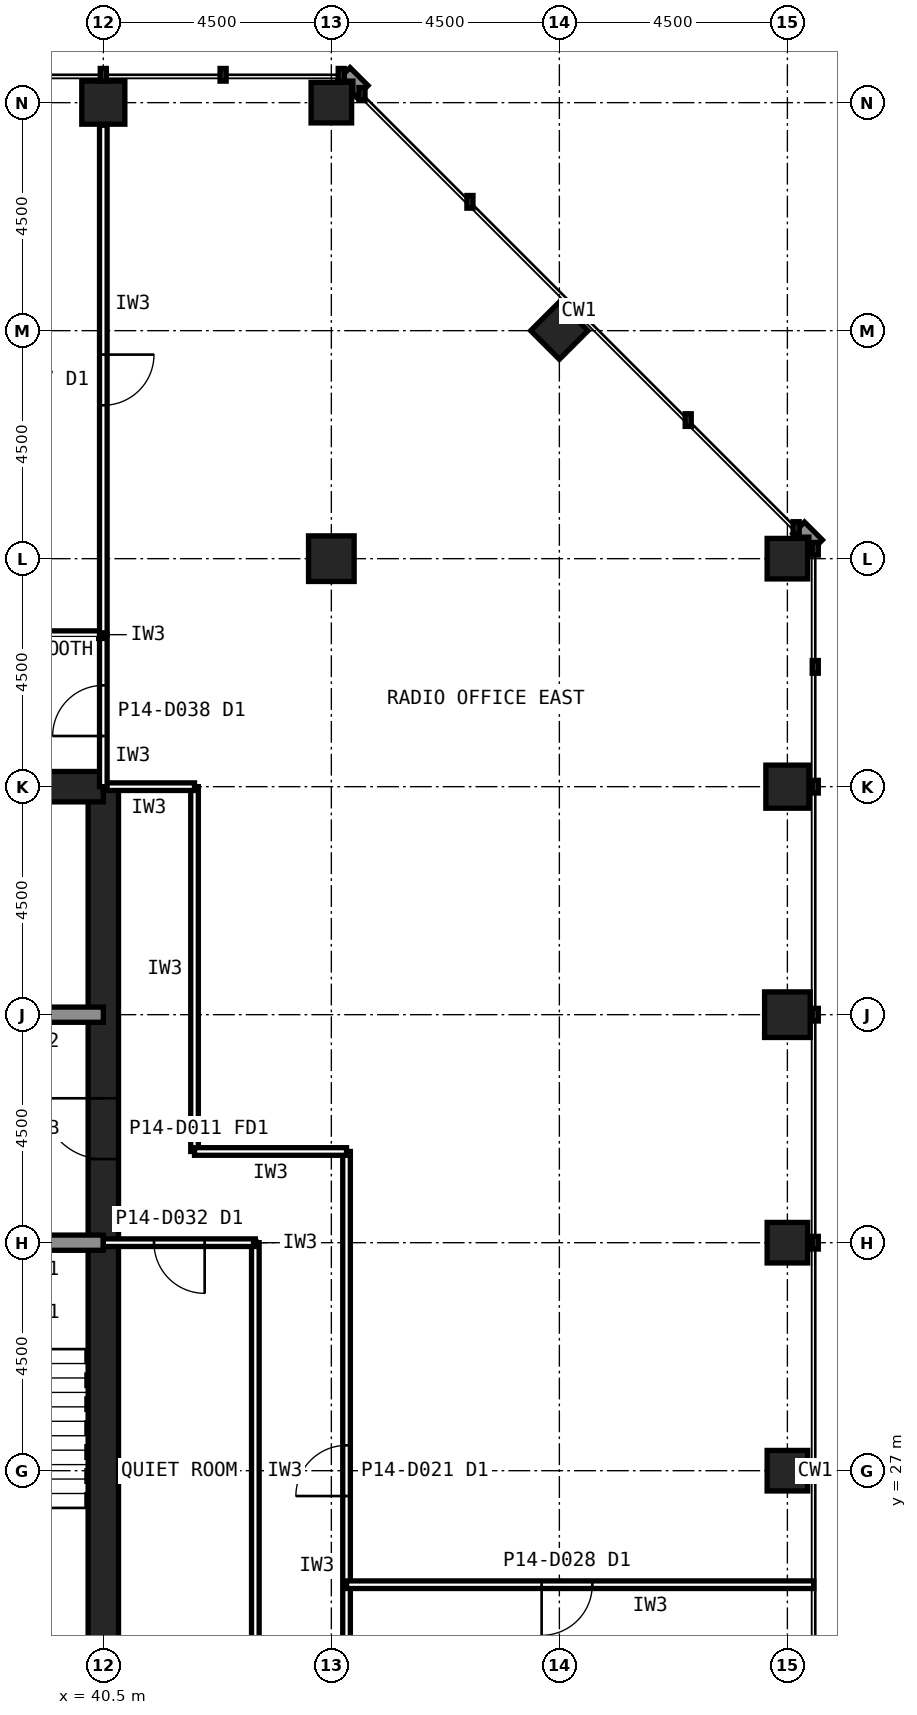
"""IFC4 building model, lengths in metres.
Left out: names, types, materials, properties, quantities, classifications, styles, units other than length and angle.
Written with IfcOpenShell. Run it as: python <this file> out.ifc"""

import sys

from ifc_helpers import new_model, si_unit, direction, frame, frame_2d, origin, origin_2d, place, context, subcontext, project, spatial, rectangle, hollow_rectangle, extrude, element, fill, save


model = new_model("IFC4")
c1 = context("Model", 3, precision=1e-05, world=origin(), true_north=direction((0.0, 1.0)))
c2 = subcontext(c1, "Body", "Model", "MODEL_VIEW")
j1 = project(units=[si_unit("LENGTHUNIT", "METRE"), si_unit("PLANEANGLEUNIT", "RADIAN")], contexts=[c1])
p1 = place(None, origin())
s1 = spatial("IfcSite", under=j1, at=p1, CompositionType="ELEMENT")
p2 = place(p1, origin())
s2 = spatial("IfcBuilding", under=s1, at=p2, CompositionType="ELEMENT")
p3 = place(p2, frame((0.0, 0.0, 62.6)))
s3 = spatial("IfcBuildingStorey", under=s2, at=p3, CompositionType="ELEMENT", Elevation=62.6)
for number, where, z_axis, x_axis in (
    (1, (54.0, 27.0, 0.0), (0.0, 0.0, 1.0), (1.0, 0.0, 0.0)),
    (2, (54.0, 31.5, 0.0), (0.0, 0.0, 1.0), (1.0, 0.0, 0.0)),
):
    element("IfcColumn", number, at=place(p3, frame(where, z_axis=z_axis, x_axis=x_axis)), inside=s3, PredefinedType="COLUMN", context=c2, shape_type="SweptSolid", body=[
        extrude(hollow_rectangle(XDim=0.8, YDim=0.8, WallThickness=0.045, at=origin_2d()), origin(), (0.0, 0.0, 1.0), 4.2),
    ])
p4 = place(p3, frame((54.0, 36.0, 0.0), z_axis=(0.0, 0.0, 1.0), x_axis=(1.0, 0.0, 0.0)))
e3 = element("IfcColumn", 3, at=p4, inside=s3, PredefinedType="COLUMN", context=c2, shape_type="SweptSolid", body=[
    extrude(hollow_rectangle(XDim=0.9, YDim=0.9, WallThickness=0.063, at=origin_2d()), origin(), (0.0, 0.0, 1.0), 4.2),
])
p5 = place(p3, frame((54.0, 40.5, 0.0), z_axis=(0.0, 0.0, 1.0), x_axis=(1.0, 0.0, 0.0)))
e4 = element("IfcColumn", 4, at=p5, inside=s3, PredefinedType="COLUMN", context=c2, shape_type="SweptSolid", body=[
    extrude(hollow_rectangle(XDim=0.85, YDim=0.85, WallThickness=0.05, at=origin_2d()), origin(), (0.0, 0.0, 1.0), 4.2),
])
for number, where, z_axis, x_axis in (
    (5, (54.0, 45.0, 0.0), (0.0, 0.0, 1.0), (1.0, 0.0, 0.0)),
    (6, (45.0, 54.0, 0.0), (0.0, 0.0, 1.0), (1.0, 0.0, 0.0)),
):
    element("IfcColumn", number, at=place(p3, frame(where, z_axis=z_axis, x_axis=x_axis)), inside=s3, PredefinedType="COLUMN", context=c2, shape_type="SweptSolid", body=[
        extrude(hollow_rectangle(XDim=0.8, YDim=0.8, WallThickness=0.045, at=origin_2d()), origin(), (0.0, 0.0, 1.0), 4.2),
    ])
p6 = place(p3, frame((40.5, 54.0, 0.0), z_axis=(0.0, 0.0, 1.0), x_axis=(1.0, 0.0, 0.0)))
e7 = element("IfcColumn", 7, at=p6, inside=s3, PredefinedType="COLUMN", context=c2, shape_type="SweptSolid", body=[
    extrude(hollow_rectangle(XDim=0.85, YDim=0.85, WallThickness=0.05, at=origin_2d()), origin(), (0.0, 0.0, 1.0), 4.2),
])
p7 = place(p3, frame((49.5, 49.5, 0.0), z_axis=(0.0, 0.0, 1.0), x_axis=(0.707106781187, 0.707106781187, 0.0)))
e8 = element("IfcColumn", 8, at=p7, inside=s3, PredefinedType="COLUMN", context=c2, shape_type="SweptSolid", body=[
    extrude(hollow_rectangle(XDim=0.8, YDim=0.8, WallThickness=0.045, at=origin_2d()), origin(), (0.0, 0.0, 1.0), 4.2),
])
p8 = place(p3, frame((45.0, 45.0, 0.0), z_axis=(0.0, 0.0, 1.0), x_axis=(1.0, 0.0, 0.0)))
e9 = element("IfcColumn", 9, at=p8, inside=s3, PredefinedType="COLUMN", context=c2, shape_type="SweptSolid", body=[
    extrude(hollow_rectangle(XDim=0.9, YDim=0.9, WallThickness=0.063, at=origin_2d()), origin(), (0.0, 0.0, 1.0), 4.2),
])
p9 = place(p3, frame((40.5, 13.5, 0.0), z_axis=(0.0, 0.0, 1.0), x_axis=(0.0, 1.0, 0.0)))
e10 = element("IfcWall", 10, at=p9, inside=s3, PredefinedType="SHEAR", context=c2, shape_type="SweptSolid", body=[
    extrude(rectangle(XDim=27.0, YDim=0.6, at=frame_2d((13.5, 0.0))), origin(), (0.0, 0.0, 1.0), 4.2),
])
p10 = place(p9, frame((5.85, 0.0, 0.0)))
e11 = element("IfcOpeningElement", 11, at=p10, cuts=e10, PredefinedType="OPENING", context=c2, shape_type="SweptSolid", body=[
    extrude(rectangle(XDim=1.8, YDim=2.1, at=frame_2d((0.9, 1.05))), frame((0.0, 0.31, 0.0), z_axis=(0.0, -1.0, 0.0), x_axis=(1.0, 0.0, 0.0)), (0.0, 0.0, 1.0), 0.62),
])
p11 = place(p9, frame((19.65, 0.0, 0.0)))
e12 = element("IfcOpeningElement", 12, at=p11, cuts=e10, PredefinedType="OPENING", context=c2, shape_type="SweptSolid", body=[
    extrude(rectangle(XDim=1.2, YDim=2.1, at=frame_2d((0.6, 1.05))), frame((0.0, 0.31, 0.0), z_axis=(0.0, -1.0, 0.0), x_axis=(1.0, 0.0, 0.0)), (0.0, 0.0, 1.0), 0.62),
])
p12 = place(p3, frame((40.5, 40.5, 0.0), z_axis=(0.0, 0.0, 1.0), x_axis=(-1.0, 0.0, 0.0)))
e13 = element("IfcWall", 13, at=p12, inside=s3, PredefinedType="SHEAR", context=c2, shape_type="SweptSolid", body=[
    extrude(rectangle(XDim=27.0, YDim=0.6, at=frame_2d((13.5, 0.0))), origin(), (0.0, 0.0, 1.0), 4.2),
])
p13 = place(p3, frame((13.5, 36.0, 0.0), z_axis=(0.0, 0.0, 1.0), x_axis=(1.0, 0.0, 0.0)))
e14 = element("IfcWall", 14, at=p13, inside=s3, PredefinedType="SOLIDWALL", context=c2, shape_type="SweptSolid", body=[
    extrude(rectangle(XDim=27.0, YDim=0.3, at=frame_2d((13.5, 0.0))), origin(), (0.0, 0.0, 1.0), 4.04),
])
p14 = place(p13, frame((1.8, 0.0, 0.0)))
e15 = element("IfcOpeningElement", 15, at=p14, cuts=e14, PredefinedType="OPENING", context=c2, shape_type="SweptSolid", body=[
    extrude(rectangle(XDim=0.9, YDim=2.1, at=frame_2d((0.45, 1.05))), frame((0.0, 0.16, 0.0), z_axis=(0.0, -1.0, 0.0), x_axis=(1.0, 0.0, 0.0)), (0.0, 0.0, 1.0), 0.32),
])
p15 = place(p13, frame((24.1, 0.0, 0.0)))
e16 = element("IfcOpeningElement", 16, at=p15, cuts=e14, PredefinedType="OPENING", context=c2, shape_type="SweptSolid", body=[
    extrude(rectangle(XDim=1.3, YDim=2.2, at=frame_2d((0.65, 1.1))), frame((0.0, 0.16, 0.0), z_axis=(0.0, -1.0, 0.0), x_axis=(1.0, 0.0, 0.0)), (0.0, 0.0, 1.0), 0.32),
])
p16 = place(p3, frame((13.5, 31.5, 0.0), z_axis=(0.0, 0.0, 1.0), x_axis=(1.0, 0.0, 0.0)))
e17 = element("IfcWall", 17, at=p16, inside=s3, PredefinedType="SOLIDWALL", context=c2, shape_type="SweptSolid", body=[
    extrude(rectangle(XDim=27.0, YDim=0.3, at=frame_2d((13.5, 0.0))), origin(), (0.0, 0.0, 1.0), 4.04),
])
p17 = place(p16, frame((24.15, 0.0, 0.0)))
e18 = element("IfcOpeningElement", 18, at=p17, cuts=e17, PredefinedType="OPENING", context=c2, shape_type="SweptSolid", body=[
    extrude(rectangle(XDim=1.2, YDim=2.1, at=frame_2d((0.6, 1.05))), frame((0.0, 0.16, 0.0), z_axis=(0.0, -1.0, 0.0), x_axis=(1.0, 0.0, 0.0)), (0.0, 0.0, 1.0), 0.32),
])
p18 = place(p16, frame((15.3, 0.0, 0.0)))
e19 = element("IfcOpeningElement", 19, at=p18, cuts=e17, PredefinedType="OPENING", context=c2, shape_type="SweptSolid", body=[
    extrude(rectangle(XDim=0.9, YDim=2.1, at=frame_2d((0.45, 1.05))), frame((0.0, 0.16, 0.0), z_axis=(0.0, -1.0, 0.0), x_axis=(1.0, 0.0, 0.0)), (0.0, 0.0, 1.0), 0.32),
])
p19 = place(p16, frame((19.8, 0.0, 0.0)))
e20 = element("IfcOpeningElement", 20, at=p19, cuts=e17, PredefinedType="OPENING", context=c2, shape_type="SweptSolid", body=[
    extrude(rectangle(XDim=0.9, YDim=2.1, at=frame_2d((0.45, 1.05))), frame((0.0, 0.16, 0.0), z_axis=(0.0, -1.0, 0.0), x_axis=(1.0, 0.0, 0.0)), (0.0, 0.0, 1.0), 0.32),
])
p20 = place(p3, frame((45.3, 20.7, 0.0), z_axis=(0.0, 0.0, 1.0), x_axis=(0.0, 1.0, 0.0)))
e21 = element("IfcWall", 21, at=p20, inside=s3, PredefinedType="PARTITIONING", context=c2, shape_type="SweptSolid", body=[
    extrude(rectangle(XDim=12.6, YDim=0.15, at=frame_2d((6.3, 0.0))), origin(), (0.0, 0.0, 1.0), 4.04),
])
p21 = place(p20, frame((5.8, 0.0, 0.0)))
e22 = element("IfcOpeningElement", 22, at=p21, cuts=e21, PredefinedType="OPENING", context=c2, shape_type="SweptSolid", body=[
    extrude(rectangle(XDim=1.0, YDim=2.1, at=frame_2d((0.5, 1.05))), frame((0.0, 0.085, 0.0), z_axis=(0.0, -1.0, 0.0), x_axis=(1.0, 0.0, 0.0)), (0.0, 0.0, 1.0), 0.17),
])
p22 = place(p3, frame((42.3, 33.3, 0.0), z_axis=(0.0, 0.0, 1.0), x_axis=(0.0, 1.0, 0.0)))
e23 = element("IfcWall", 23, at=p22, inside=s3, PredefinedType="PARTITIONING", context=c2, shape_type="SweptSolid", body=[
    extrude(rectangle(XDim=7.2, YDim=0.15, at=frame_2d((3.6, 0.0))), origin(), (0.0, 0.0, 1.0), 4.04),
])
p23 = place(p3, frame((45.3, 33.3, 0.0), z_axis=(0.0, 0.0, 1.0), x_axis=(-1.0, 0.0, 0.0)))
e24 = element("IfcWall", 24, at=p23, inside=s3, PredefinedType="PARTITIONING", context=c2, shape_type="SweptSolid", body=[
    extrude(rectangle(XDim=3.0, YDim=0.15, at=frame_2d((1.5, 0.0))), origin(), (0.0, 0.0, 1.0), 4.04),
])
p24 = place(p3, frame((42.3, 40.5, 0.0), z_axis=(0.0, 0.0, 1.0), x_axis=(-1.0, 0.0, 0.0)))
e25 = element("IfcWall", 25, at=p24, inside=s3, PredefinedType="PARTITIONING", context=c2, shape_type="SweptSolid", body=[
    extrude(rectangle(XDim=1.8, YDim=0.15, at=frame_2d((0.9, 0.0))), origin(), (0.0, 0.0, 1.0), 3.189),
])
p25 = place(p3, frame((40.5, 40.5, 0.0), z_axis=(0.0, 0.0, 1.0), x_axis=(0.0, 1.0, 0.0)))
e26 = element("IfcWall", 26, at=p25, inside=s3, PredefinedType="PARTITIONING", context=c2, shape_type="SweptSolid", body=[
    extrude(rectangle(XDim=3.0, YDim=0.15, at=frame_2d((1.5, 0.0))), origin(), (0.0, 0.0, 1.0), 3.189),
])
p26 = place(p25, frame((1.0, 0.0, 0.0)))
e27 = element("IfcOpeningElement", 27, at=p26, cuts=e26, PredefinedType="OPENING", context=c2, shape_type="SweptSolid", body=[
    extrude(rectangle(XDim=1.0, YDim=2.1, at=frame_2d((0.5, 1.05))), frame((0.0, 0.085, 0.0), z_axis=(0.0, -1.0, 0.0), x_axis=(1.0, 0.0, 0.0)), (0.0, 0.0, 1.0), 0.17),
])
p27 = place(p3, frame((40.5, 43.5, 0.0), z_axis=(0.0, 0.0, 1.0), x_axis=(-1.0, 0.0, 0.0)))
e28 = element("IfcWall", 28, at=p27, inside=s3, PredefinedType="PARTITIONING", context=c2, shape_type="SweptSolid", body=[
    extrude(rectangle(XDim=3.375, YDim=0.15, at=frame_2d((1.688, 0.0))), origin(), (0.0, 0.0, 1.0), 4.04),
])
p28 = place(p3, frame((43.5, 22.5, 0.0), z_axis=(0.0, 0.0, 1.0), x_axis=(0.0, 1.0, 0.0)))
e29 = element("IfcWall", 29, at=p28, inside=s3, PredefinedType="PARTITIONING", context=c2, shape_type="SweptSolid", body=[
    extrude(rectangle(XDim=9.0, YDim=0.15, at=frame_2d((4.5, 0.0))), origin(), (0.0, 0.0, 1.0), 4.04),
])
p29 = place(p3, frame((43.5, 31.5, 0.0), z_axis=(0.0, 0.0, 1.0), x_axis=(-1.0, 0.0, 0.0)))
e30 = element("IfcWall", 30, at=p29, inside=s3, PredefinedType="PARTITIONING", context=c2, shape_type="SweptSolid", body=[
    extrude(rectangle(XDim=3.0, YDim=0.15, at=frame_2d((1.5, 0.0))), origin(), (0.0, 0.0, 1.0), 3.189),
])
p30 = place(p29, frame((1.0, 0.0, 0.0)))
e31 = element("IfcOpeningElement", 31, at=p30, cuts=e30, PredefinedType="OPENING", context=c2, shape_type="SweptSolid", body=[
    extrude(rectangle(XDim=1.0, YDim=2.1, at=frame_2d((0.5, 1.05))), frame((0.0, 0.085, 0.0), z_axis=(0.0, -1.0, 0.0), x_axis=(1.0, 0.0, 0.0)), (0.0, 0.0, 1.0), 0.17),
])
p31 = place(p3, frame((40.5, 53.555, 0.0), z_axis=(0.0, 0.0, 1.0), x_axis=(0.0, -1.0, 0.0)))
e32 = element("IfcWall", 32, at=p31, inside=s3, PredefinedType="PARTITIONING", context=c2, shape_type="SweptSolid", body=[
    extrude(rectangle(XDim=10.055, YDim=0.15, at=frame_2d((5.027, 0.0))), origin(), (0.0, 0.0, 1.0), 3.189),
])
p32 = place(p31, frame((4.528, 0.0, 0.0)))
e33 = element("IfcOpeningElement", 33, at=p32, cuts=e32, PredefinedType="OPENING", context=c2, shape_type="SweptSolid", body=[
    extrude(rectangle(XDim=1.0, YDim=2.1, at=frame_2d((0.5, 1.05))), frame((0.0, 0.085, 0.0), z_axis=(0.0, -1.0, 0.0), x_axis=(1.0, 0.0, 0.0)), (0.0, 0.0, 1.0), 0.17),
])
p33 = place(p3, frame((54.52, 24.75, 0.0), z_axis=(0.0, 0.0, 1.0), x_axis=(-1.0, 0.0, 0.0)))
e34 = element("IfcWall", 34, at=p33, inside=s3, PredefinedType="PARTITIONING", context=c2, shape_type="SweptSolid", body=[
    extrude(rectangle(XDim=9.22, YDim=0.15, at=frame_2d((4.61, 0.0))), origin(), (0.0, 0.0, 1.0), 4.04),
])
p34 = place(p33, frame((4.37, 0.0, 0.0)))
e35 = element("IfcOpeningElement", 35, at=p34, cuts=e34, PredefinedType="OPENING", context=c2, shape_type="SweptSolid", body=[
    extrude(rectangle(XDim=1.0, YDim=2.1, at=frame_2d((0.5, 1.05))), frame((0.0, 0.085, 0.0), z_axis=(0.0, -1.0, 0.0), x_axis=(1.0, 0.0, 0.0)), (0.0, 0.0, 1.0), 0.17),
])
p35 = place(p11, origin())
e36 = element("IfcDoor", 36, at=p35, inside=s3, OperationType="SINGLE_SWING_RIGHT", PredefinedType="DOOR", context=c2, shape_type="SweptSolid", body=[
    extrude(rectangle(XDim=1.2, YDim=2.1, at=frame_2d((0.6, 1.05))), frame((0.0, 0.025, 0.0), z_axis=(0.0, -1.0, 0.0), x_axis=(1.0, 0.0, 0.0)), (0.0, 0.0, 1.0), 0.05),
])
fill(e12, e36)
p36 = place(p21, origin())
e37 = element("IfcDoor", 37, at=p36, inside=s3, OperationType="SINGLE_SWING_LEFT", PredefinedType="DOOR", context=c2, shape_type="SweptSolid", body=[
    extrude(rectangle(XDim=1.0, YDim=2.1, at=frame_2d((0.5, 1.05))), frame((0.0, 0.025, 0.0), z_axis=(0.0, -1.0, 0.0), x_axis=(1.0, 0.0, 0.0)), (0.0, 0.0, 1.0), 0.05),
])
fill(e22, e37)
p37 = place(p26, origin())
e38 = element("IfcDoor", 38, at=p37, inside=s3, OperationType="SINGLE_SWING_LEFT", PredefinedType="DOOR", context=c2, shape_type="SweptSolid", body=[
    extrude(rectangle(XDim=1.0, YDim=2.1, at=frame_2d((0.5, 1.05))), frame((0.0, 0.025, 0.0), z_axis=(0.0, -1.0, 0.0), x_axis=(1.0, 0.0, 0.0)), (0.0, 0.0, 1.0), 0.05),
])
fill(e27, e38)
p38 = place(p30, origin())
e39 = element("IfcDoor", 39, at=p38, inside=s3, OperationType="SINGLE_SWING_LEFT", PredefinedType="DOOR", context=c2, shape_type="SweptSolid", body=[
    extrude(rectangle(XDim=1.0, YDim=2.1, at=frame_2d((0.5, 1.05))), frame((0.0, 0.025, 0.0), z_axis=(0.0, -1.0, 0.0), x_axis=(1.0, 0.0, 0.0)), (0.0, 0.0, 1.0), 0.05),
])
fill(e31, e39)
p39 = place(p32, origin())
e40 = element("IfcDoor", 40, at=p39, inside=s3, OperationType="SINGLE_SWING_LEFT", PredefinedType="DOOR", context=c2, shape_type="SweptSolid", body=[
    extrude(rectangle(XDim=1.0, YDim=2.1, at=frame_2d((0.5, 1.05))), frame((0.0, 0.025, 0.0), z_axis=(0.0, -1.0, 0.0), x_axis=(1.0, 0.0, 0.0)), (0.0, 0.0, 1.0), 0.05),
])
fill(e33, e40)
p40 = place(p34, origin())
e41 = element("IfcDoor", 41, at=p40, inside=s3, OperationType="SINGLE_SWING_RIGHT", PredefinedType="DOOR", context=c2, shape_type="SweptSolid", body=[
    extrude(rectangle(XDim=1.0, YDim=2.1, at=frame_2d((0.5, 1.05))), frame((0.0, 0.025, 0.0), z_axis=(0.0, -1.0, 0.0), x_axis=(1.0, 0.0, 0.0)), (0.0, 0.0, 1.0), 0.05),
])
fill(e35, e41)
save(model, sys.argv[1])
